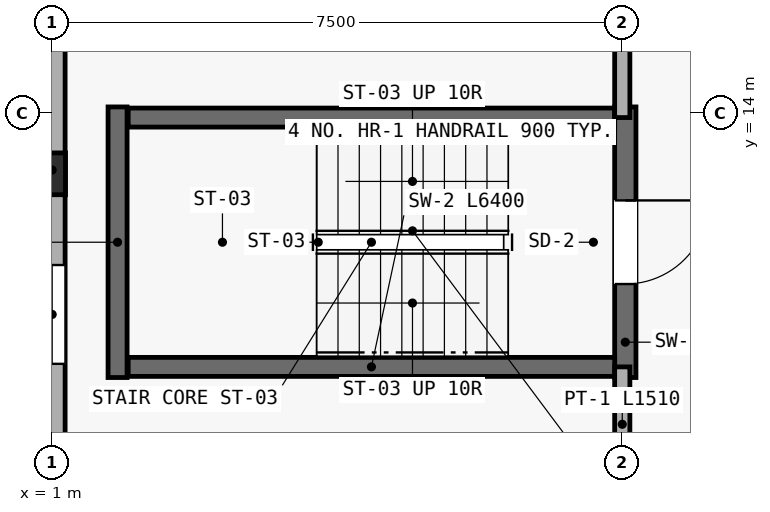
"""IFC4 building model, lengths in metres.
Left out: names, types, materials, properties, quantities, classifications, styles, units other than length and angle.
Written with IfcOpenShell. Run it as: python <this file> out.ifc"""

import sys

from ifc_helpers import new_model, si_unit, direction, frame, frame_2d, origin, origin_2d, place, context, subcontext, project, spatial, rectangle, extrude, element, fill, save


model = new_model("IFC4")
c1 = context("Model", 3, precision=1e-05, world=origin(), true_north=direction((0.0, 1.0)))
c2 = subcontext(c1, "Body", "Model", "MODEL_VIEW")
j1 = project(units=[si_unit("LENGTHUNIT", "METRE"), si_unit("PLANEANGLEUNIT", "RADIAN")], contexts=[c1])
p1 = place(None, origin())
s1 = spatial("IfcSite", under=j1, at=p1, CompositionType="ELEMENT")
p2 = place(p1, origin())
s2 = spatial("IfcBuilding", under=s1, at=p2, CompositionType="ELEMENT")
p3 = place(p2, frame((0.0, 0.0, 9.3)))
s3 = spatial("IfcBuildingStorey", under=s2, at=p3, CompositionType="ELEMENT", Elevation=9.3)
p4 = place(p3, frame((1.0, 13.2, 0.0), z_axis=(0.0, 0.0, 1.0), x_axis=(1.0, 0.0, 0.0)))
e1 = element("IfcColumn", 1, at=p4, inside=s3, PredefinedType="PILASTER", context=c2, shape_type="SweptSolid", body=[
    extrude(rectangle(XDim=0.35, YDim=0.55, at=origin_2d()), origin(), (0.0, 0.0, 1.0), 3.45),
])
p5 = place(p3, frame((1.0, 17.225, 0.0), z_axis=(0.0, 0.0, 1.0), x_axis=(0.0, -1.0, 0.0)))
e2 = element("IfcWall", 2, at=p5, inside=s3, PredefinedType="STANDARD", context=c2, shape_type="SweptSolid", body=[
    extrude(rectangle(XDim=7.95, YDim=0.34, at=frame_2d((3.975, 0.0))), origin(), (0.0, 0.0, 1.0), 2.75),
])
p6 = place(p5, frame((1.525, 0.0, 0.7)))
e3 = element("IfcOpeningElement", 3, at=p6, cuts=e2, PredefinedType="OPENING", context=c2, shape_type="SweptSolid", body=[
    extrude(rectangle(XDim=0.88, YDim=1.5, at=frame_2d((0.44, 0.75))), frame((0.0, 0.18, 0.0), z_axis=(0.0, -1.0, 0.0), x_axis=(1.0, 0.0, 0.0)), (0.0, 0.0, 1.0), 0.36),
])
p7 = place(p5, frame((5.225, 0.0, 0.7)))
e4 = element("IfcOpeningElement", 4, at=p7, cuts=e2, PredefinedType="OPENING", context=c2, shape_type="SweptSolid", body=[
    extrude(rectangle(XDim=1.3, YDim=1.4, at=frame_2d((0.65, 0.7))), frame((0.0, 0.18, 0.0), z_axis=(0.0, -1.0, 0.0), x_axis=(1.0, 0.0, 0.0)), (0.0, 0.0, 1.0), 0.36),
])
p8 = place(p3, frame((8.54, 14.08, 0.0), z_axis=(0.0, 0.0, 1.0), x_axis=(0.0, -1.0, 0.0)))
e5 = element("IfcWall", 5, at=p8, inside=s3, PredefinedType="SHEAR", context=c2, shape_type="SweptSolid", body=[
    extrude(rectangle(XDim=3.56, YDim=0.28, at=frame_2d((1.78, 0.0))), origin(), (0.0, 0.0, 1.0), 3.2),
])
p9 = place(p8, frame((1.23, 0.0, 0.0)))
e6 = element("IfcOpeningElement", 6, at=p9, cuts=e5, PredefinedType="OPENING", context=c2, shape_type="SweptSolid", body=[
    extrude(rectangle(XDim=1.1, YDim=2.15, at=frame_2d((0.55, 1.075))), frame((0.0, 0.15, 0.0), z_axis=(0.0, -1.0, 0.0), x_axis=(1.0, 0.0, 0.0)), (0.0, 0.0, 1.0), 0.3),
])
p10 = place(p3, frame((1.86, 10.52, 0.0), z_axis=(0.0, 0.0, 1.0), x_axis=(0.0, 1.0, 0.0)))
e7 = element("IfcWall", 7, at=p10, inside=s3, PredefinedType="SHEAR", context=c2, shape_type="SweptSolid", body=[
    extrude(rectangle(XDim=3.56, YDim=0.25, at=frame_2d((1.78, 0.0))), origin(), (0.0, 0.0, 1.0), 3.2),
])
for number, where, z_axis, x_axis in (
    (8, (8.4, 13.94, 0.0), (0.0, 0.0, 1.0), (-1.0, 0.0, 0.0)),
    (9, (2.0, 10.66, 0.0), (0.0, 0.0, 1.0), (1.0, 0.0, 0.0)),
):
    element("IfcWall", number, at=place(p3, frame(where, z_axis=z_axis, x_axis=x_axis)), inside=s3, PredefinedType="SHEAR", context=c2, shape_type="SweptSolid", body=[
        extrude(rectangle(XDim=6.4, YDim=0.25, at=frame_2d((3.2, 0.0))), origin(), (0.0, 0.0, 1.0), 3.2),
    ])
p11 = place(p3, frame((8.5, 9.15, 0.0), z_axis=(0.0, 0.0, 1.0), x_axis=(0.0, 1.0, 0.0)))
e10 = element("IfcWall", 10, at=p11, inside=s3, PredefinedType="PARTITIONING", context=c2, shape_type="SweptSolid", body=[
    extrude(rectangle(XDim=1.51, YDim=0.2, at=frame_2d((0.755, 0.0))), origin(), (0.0, 0.0, 1.0), 2.7),
])
p12 = place(p3, frame((8.5, 13.94, 0.0), z_axis=(0.0, 0.0, 1.0), x_axis=(0.0, 1.0, 0.0)))
e11 = element("IfcWall", 11, at=p12, inside=s3, PredefinedType="PARTITIONING", context=c2, shape_type="SweptSolid", body=[
    extrude(rectangle(XDim=5.03, YDim=0.2, at=frame_2d((2.515, 0.0))), origin(), (0.0, 0.0, 1.0), 2.7),
])
p13 = place(p12, frame((1.35, 0.0, 0.0)))
e12 = element("IfcOpeningElement", 12, at=p13, cuts=e11, PredefinedType="OPENING", context=c2, shape_type="SweptSolid", body=[
    extrude(rectangle(XDim=0.98, YDim=2.12, at=frame_2d((0.49, 1.06))), frame((0.0, 0.11, 0.0), z_axis=(0.0, -1.0, 0.0), x_axis=(1.0, 0.0, 0.0)), (0.0, 0.0, 1.0), 0.22),
])
p14 = place(p7, origin())
e13 = element("IfcWindow", 13, at=p14, inside=s3, PartitioningType="SINGLE_PANEL", PredefinedType="WINDOW", context=c2, shape_type="SweptSolid", body=[
    extrude(rectangle(XDim=1.3, YDim=1.4, at=frame_2d((0.65, 0.7))), frame((0.0, 0.03, 0.0), z_axis=(0.0, -1.0, 0.0), x_axis=(1.0, 0.0, 0.0)), (0.0, 0.0, 1.0), 0.06),
])
fill(e4, e13)
p15 = place(p9, origin())
e14 = element("IfcDoor", 14, at=p15, inside=s3, OperationType="SINGLE_SWING_LEFT", PredefinedType="DOOR", context=c2, shape_type="SweptSolid", body=[
    extrude(rectangle(XDim=1.1, YDim=2.15, at=frame_2d((0.55, 1.075))), frame((0.0, 0.025, 0.0), z_axis=(0.0, -1.0, 0.0), x_axis=(1.0, 0.0, 0.0)), (0.0, 0.0, 1.0), 0.05),
])
fill(e6, e14)
save(model, sys.argv[1])
